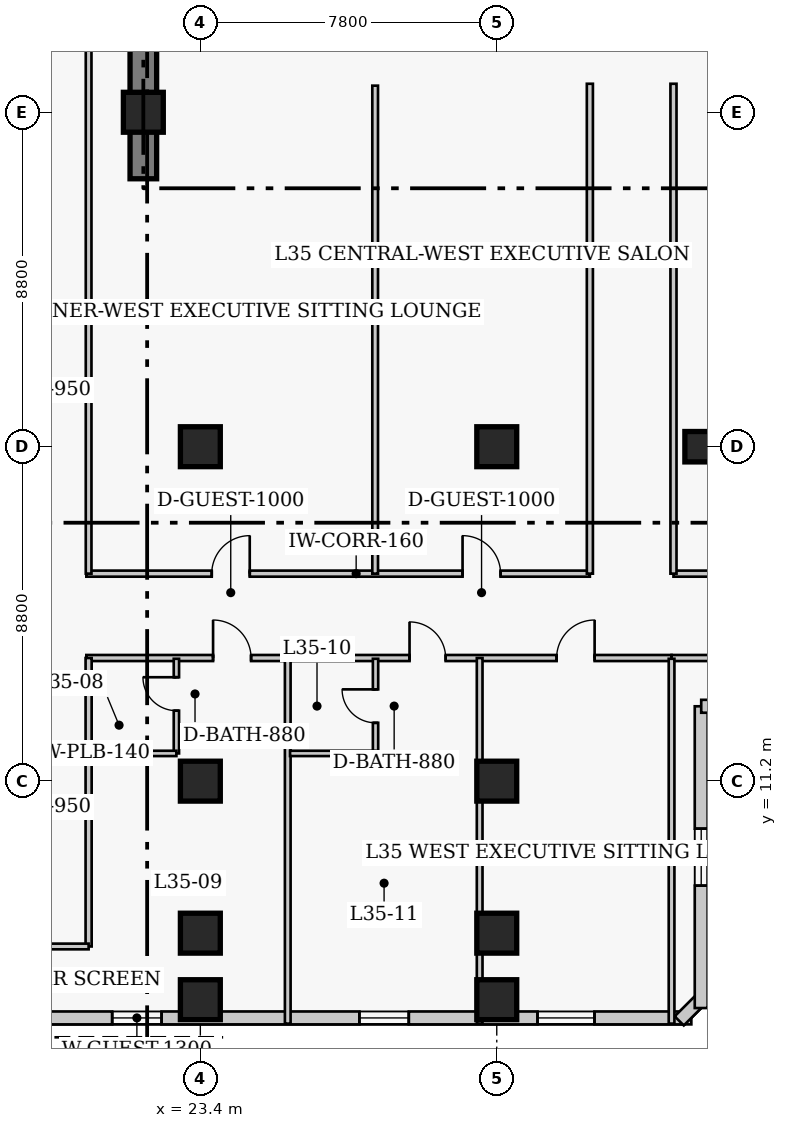
"""IFC4 building model, lengths in metres.
Left out: names, types, materials, properties, quantities, classifications, styles, units other than length and angle.
Written with IfcOpenShell. Run it as: python <this file> out.ifc"""

import sys

from ifc_helpers import new_model, si_unit, direction, frame, frame_2d, origin, origin_2d, place, context, subcontext, project, spatial, rectangle, extrude, element, fill, save


model = new_model("IFC4")
c1 = context("Model", 3, precision=1e-05, world=origin(), true_north=direction((0.0, 1.0)))
c2 = subcontext(c1, "Body", "Model", "MODEL_VIEW")
j1 = project(units=[si_unit("LENGTHUNIT", "METRE"), si_unit("PLANEANGLEUNIT", "RADIAN")], contexts=[c1])
p1 = place(None, origin())
s1 = spatial("IfcSite", under=j1, at=p1, CompositionType="ELEMENT")
p2 = place(p1, origin())
s2 = spatial("IfcBuilding", under=s1, at=p2, CompositionType="ELEMENT")
p3 = place(p2, frame((0.0, 0.0, 142.2)))
s3 = spatial("IfcBuildingStorey", under=s2, at=p3, CompositionType="ELEMENT", Elevation=142.2)
p4 = place(p3, frame((21.9, 27.05, 0.0), z_axis=(0.0, 0.0, 1.0), x_axis=(0.0, 1.0, 0.0)))
e1 = element("IfcWall", 1, at=p4, inside=s3, PredefinedType="SHEAR", context=c2, shape_type="SweptSolid", body=[
    extrude(rectangle(XDim=13.62, YDim=0.7, at=frame_2d((6.81, 0.0))), origin(), (0.0, 0.0, 1.0), 3.8),
])
for number, where, z_axis, x_axis in (
    (2, (23.4, 11.2, 0.0), (0.0, 0.0, 1.0), (1.0, 0.0, 0.0)),
    (3, (23.4, 20.0, 0.0), (0.0, 0.0, 1.0), (1.0, 0.0, 0.0)),
    (4, (31.2, 11.2, 0.0), (0.0, 0.0, 1.0), (1.0, 0.0, 0.0)),
    (5, (31.2, 20.0, 0.0), (0.0, 0.0, 1.0), (1.0, 0.0, 0.0)),
):
    element("IfcColumn", number, at=place(p3, frame(where, z_axis=z_axis, x_axis=x_axis)), inside=s3, PredefinedType="COLUMN", context=c2, shape_type="SweptSolid", body=[
        extrude(rectangle(XDim=1.05, YDim=1.05, at=origin_2d()), origin(), (0.0, 0.0, 1.0), 3.8),
    ])
p5 = place(p3, frame((36.75, 20.0, 0.0), z_axis=(0.0, 0.0, 1.0), x_axis=(1.0, 0.0, 0.0)))
e6 = element("IfcColumn", 6, at=p5, inside=s3, PredefinedType="COLUMN", context=c2, shape_type="SweptSolid", body=[
    extrude(rectangle(XDim=1.2, YDim=0.8, at=origin_2d()), origin(), (0.0, 0.0, 1.0), 3.8),
])
for number, where, z_axis, x_axis in (
    (7, (21.9, 28.8, 0.0), (0.0, 0.0, 1.0), (1.0, 0.0, 0.0)),
    (8, (23.4, 7.2, 0.0), (0.0, 0.0, 1.0), (1.0, 0.0, 0.0)),
    (9, (31.2, 7.2, 0.0), (0.0, 0.0, 1.0), (1.0, 0.0, 0.0)),
    (10, (23.4, 5.45, 0.0), (0.0, 0.0, 1.0), (1.0, 0.0, 0.0)),
    (11, (31.2, 5.45, 0.0), (0.0, 0.0, 1.0), (1.0, 0.0, 0.0)),
):
    element("IfcColumn", number, at=place(p3, frame(where, z_axis=z_axis, x_axis=x_axis)), inside=s3, PredefinedType="COLUMN", context=c2, shape_type="SweptSolid", body=[
        extrude(rectangle(XDim=1.05, YDim=1.05, at=origin_2d()), origin(), (0.0, 0.0, 1.0), 3.8),
    ])
p6 = place(p3, frame((9.63, 4.97, 0.0), z_axis=(0.0, 0.0, 1.0), x_axis=(1.0, 0.0, 0.0)))
e12 = element("IfcWall", 12, at=p6, inside=s3, PredefinedType="SOLIDWALL", context=c2, shape_type="SweptSolid", body=[
    extrude(rectangle(XDim=26.69, YDim=0.34, at=frame_2d((13.345, 0.0))), origin(), (0.0, 0.0, 1.0), 3.55),
])
p7 = place(p6, frame((3.048, 0.0, 0.85)))
e13 = element("IfcOpeningElement", 13, at=p7, cuts=e12, PredefinedType="OPENING", context=c2, shape_type="SweptSolid", body=[
    extrude(rectangle(XDim=1.5, YDim=1.75, at=frame_2d((0.75, 0.875))), frame((0.0, 0.18, 0.0), z_axis=(0.0, -1.0, 0.0), x_axis=(1.0, 0.0, 0.0)), (0.0, 0.0, 1.0), 0.36),
])
p8 = place(p6, frame((22.642, 0.0, 0.85)))
e14 = element("IfcOpeningElement", 14, at=p8, cuts=e12, PredefinedType="OPENING", context=c2, shape_type="SweptSolid", body=[
    extrude(rectangle(XDim=1.5, YDim=1.75, at=frame_2d((0.75, 0.875))), frame((0.0, 0.18, 0.0), z_axis=(0.0, -1.0, 0.0), x_axis=(1.0, 0.0, 0.0)), (0.0, 0.0, 1.0), 0.36),
])
p9 = place(p6, frame((11.45, 0.0, 0.85)))
e15 = element("IfcOpeningElement", 15, at=p9, cuts=e12, PredefinedType="OPENING", context=c2, shape_type="SweptSolid", body=[
    extrude(rectangle(XDim=1.3, YDim=1.7, at=frame_2d((0.65, 0.85))), frame((0.0, 0.18, 0.0), z_axis=(0.0, -1.0, 0.0), x_axis=(1.0, 0.0, 0.0)), (0.0, 0.0, 1.0), 0.36),
])
p10 = place(p6, frame((17.955, 0.0, 0.85)))
e16 = element("IfcOpeningElement", 16, at=p10, cuts=e12, PredefinedType="OPENING", context=c2, shape_type="SweptSolid", body=[
    extrude(rectangle(XDim=1.3, YDim=1.7, at=frame_2d((0.65, 0.85))), frame((0.0, 0.18, 0.0), z_axis=(0.0, -1.0, 0.0), x_axis=(1.0, 0.0, 0.0)), (0.0, 0.0, 1.0), 0.36),
])
p11 = place(p3, frame((36.001, 4.892, 0.0), z_axis=(0.0, 0.0, 1.0), x_axis=(0.707106781187, 0.707106781187, 0.0)))
e17 = element("IfcWall", 17, at=p11, inside=s3, PredefinedType="SOLIDWALL", context=c2, shape_type="SweptSolid", body=[
    extrude(rectangle(XDim=0.929, YDim=0.34, at=frame_2d((0.464, 0.0))), origin(), (0.0, 0.0, 1.0), 3.55),
])
p12 = place(p3, frame((36.58, 5.23, 0.0), z_axis=(0.0, 0.0, 1.0), x_axis=(0.0, 1.0, 0.0)))
e18 = element("IfcWall", 18, at=p12, inside=s3, PredefinedType="SOLIDWALL", context=c2, shape_type="SweptSolid", body=[
    extrude(rectangle(XDim=7.94, YDim=0.34, at=frame_2d((3.97, 0.0))), origin(), (0.0, 0.0, 1.0), 3.55),
])
p13 = place(p12, frame((3.22, 0.0, 0.85)))
e19 = element("IfcOpeningElement", 19, at=p13, cuts=e18, PredefinedType="OPENING", context=c2, shape_type="SweptSolid", body=[
    extrude(rectangle(XDim=1.5, YDim=1.75, at=frame_2d((0.75, 0.875))), frame((0.0, 0.18, 0.0), z_axis=(0.0, -1.0, 0.0), x_axis=(1.0, 0.0, 0.0)), (0.0, 0.0, 1.0), 0.36),
])
p14 = place(p3, frame((36.58, 13.17, 0.0), z_axis=(0.0, 0.0, 1.0), x_axis=(1.0, 0.0, 0.0)))
e20 = element("IfcWall", 20, at=p14, inside=s3, PredefinedType="SOLIDWALL", context=c2, shape_type="SweptSolid", body=[
    extrude(rectangle(XDim=4.84, YDim=0.34, at=frame_2d((2.42, 0.0))), origin(), (0.0, 0.0, 1.0), 3.55),
])
p15 = place(p14, frame((1.67, 0.0, 0.85)))
e21 = element("IfcOpeningElement", 21, at=p15, cuts=e20, PredefinedType="OPENING", context=c2, shape_type="SweptSolid", body=[
    extrude(rectangle(XDim=1.5, YDim=1.75, at=frame_2d((0.75, 0.875))), frame((0.0, 0.18, 0.0), z_axis=(0.0, -1.0, 0.0), x_axis=(1.0, 0.0, 0.0)), (0.0, 0.0, 1.0), 0.36),
])
p16 = place(p3, frame((20.4, 16.66, 0.0), z_axis=(0.0, 0.0, 1.0), x_axis=(1.0, 0.0, 0.0)))
e22 = element("IfcWall", 22, at=p16, inside=s3, PredefinedType="PARTITIONING", context=c2, shape_type="SweptSolid", body=[
    extrude(rectangle(XDim=13.25, YDim=0.16, at=frame_2d((6.625, 0.0))), origin(), (0.0, 0.0, 1.0), 3.55),
])
p17 = place(p16, frame((3.3, 0.0, 0.0)))
e23 = element("IfcOpeningElement", 23, at=p17, cuts=e22, PredefinedType="OPENING", context=c2, shape_type="SweptSolid", body=[
    extrude(rectangle(XDim=1.0, YDim=2.15, at=frame_2d((0.5, 1.075))), frame((0.0, 0.09, 0.0), z_axis=(0.0, -1.0, 0.0), x_axis=(1.0, 0.0, 0.0)), (0.0, 0.0, 1.0), 0.18),
])
p18 = place(p16, frame((9.9, 0.0, 0.0)))
e24 = element("IfcOpeningElement", 24, at=p18, cuts=e22, PredefinedType="OPENING", context=c2, shape_type="SweptSolid", body=[
    extrude(rectangle(XDim=1.0, YDim=2.15, at=frame_2d((0.5, 1.075))), frame((0.0, 0.09, 0.0), z_axis=(0.0, -1.0, 0.0), x_axis=(1.0, 0.0, 0.0)), (0.0, 0.0, 1.0), 0.18),
])
p19 = place(p3, frame((35.85, 16.66, 0.0), z_axis=(0.0, 0.0, 1.0), x_axis=(1.0, 0.0, 0.0)))
e25 = element("IfcWall", 25, at=p19, inside=s3, PredefinedType="PARTITIONING", context=c2, shape_type="SweptSolid", body=[
    extrude(rectangle(XDim=22.8, YDim=0.16, at=frame_2d((11.4, 0.0))), origin(), (0.0, 0.0, 1.0), 3.55),
])
p20 = place(p19, frame((9.65, 0.0, 0.0)))
e26 = element("IfcOpeningElement", 26, at=p20, cuts=e25, PredefinedType="OPENING", context=c2, shape_type="SweptSolid", body=[
    extrude(rectangle(XDim=1.0, YDim=2.15, at=frame_2d((0.5, 1.075))), frame((0.0, 0.09, 0.0), z_axis=(0.0, -1.0, 0.0), x_axis=(1.0, 0.0, 0.0)), (0.0, 0.0, 1.0), 0.18),
])
p21 = place(p19, frame((18.05, 0.0, 0.0)))
e27 = element("IfcOpeningElement", 27, at=p21, cuts=e25, PredefinedType="OPENING", context=c2, shape_type="SweptSolid", body=[
    extrude(rectangle(XDim=1.0, YDim=2.15, at=frame_2d((0.5, 1.075))), frame((0.0, 0.09, 0.0), z_axis=(0.0, -1.0, 0.0), x_axis=(1.0, 0.0, 0.0)), (0.0, 0.0, 1.0), 0.18),
])
for number, where, z_axis, x_axis in (
    (28, (33.65, 16.66, 0.0), (0.0, 0.0, 1.0), (0.0, 1.0, 0.0)),
    (29, (35.85, 16.66, 0.0), (0.0, 0.0, 1.0), (0.0, 1.0, 0.0)),
):
    element("IfcWall", number, at=place(p3, frame(where, z_axis=z_axis, x_axis=x_axis)), inside=s3, PredefinedType="PARTITIONING", context=c2, shape_type="SweptSolid", body=[
        extrude(rectangle(XDim=12.89, YDim=0.16, at=frame_2d((6.445, 0.0))), origin(), (0.0, 0.0, 1.0), 3.55),
    ])
p22 = place(p3, frame((20.4, 14.44, 0.0), z_axis=(0.0, 0.0, 1.0), x_axis=(1.0, 0.0, 0.0)))
e30 = element("IfcWall", 30, at=p22, inside=s3, PredefinedType="PARTITIONING", context=c2, shape_type="SweptSolid", body=[
    extrude(rectangle(XDim=15.4, YDim=0.16, at=frame_2d((7.7, 0.0))), origin(), (0.0, 0.0, 1.0), 3.55),
])
p23 = place(p22, frame((3.335, 0.0, 0.0)))
e31 = element("IfcOpeningElement", 31, at=p23, cuts=e30, PredefinedType="OPENING", context=c2, shape_type="SweptSolid", body=[
    extrude(rectangle(XDim=1.0, YDim=2.15, at=frame_2d((0.5, 1.075))), frame((0.0, 0.09, 0.0), z_axis=(0.0, -1.0, 0.0), x_axis=(1.0, 0.0, 0.0)), (0.0, 0.0, 1.0), 0.18),
])
p24 = place(p22, frame((8.505, 0.0, 0.0)))
e32 = element("IfcOpeningElement", 32, at=p24, cuts=e30, PredefinedType="OPENING", context=c2, shape_type="SweptSolid", body=[
    extrude(rectangle(XDim=0.95, YDim=2.1, at=frame_2d((0.475, 1.05))), frame((0.0, 0.09, 0.0), z_axis=(0.0, -1.0, 0.0), x_axis=(1.0, 0.0, 0.0)), (0.0, 0.0, 1.0), 0.18),
])
p25 = place(p22, frame((12.375, 0.0, 0.0)))
e33 = element("IfcOpeningElement", 33, at=p25, cuts=e30, PredefinedType="OPENING", context=c2, shape_type="SweptSolid", body=[
    extrude(rectangle(XDim=1.0, YDim=2.15, at=frame_2d((0.5, 1.075))), frame((0.0, 0.09, 0.0), z_axis=(0.0, -1.0, 0.0), x_axis=(1.0, 0.0, 0.0)), (0.0, 0.0, 1.0), 0.18),
])
p26 = place(p3, frame((35.8, 14.44, 0.0), z_axis=(0.0, 0.0, 1.0), x_axis=(1.0, 0.0, 0.0)))
e34 = element("IfcWall", 34, at=p26, inside=s3, PredefinedType="PARTITIONING", context=c2, shape_type="SweptSolid", body=[
    extrude(rectangle(XDim=22.85, YDim=0.16, at=frame_2d((11.425, 0.0))), origin(), (0.0, 0.0, 1.0), 3.55),
])
p27 = place(p26, frame((8.046, 0.0, 0.0)))
e35 = element("IfcOpeningElement", 35, at=p27, cuts=e34, PredefinedType="OPENING", context=c2, shape_type="SweptSolid", body=[
    extrude(rectangle(XDim=1.0, YDim=2.15, at=frame_2d((0.5, 1.075))), frame((0.0, 0.09, 0.0), z_axis=(0.0, -1.0, 0.0), x_axis=(1.0, 0.0, 0.0)), (0.0, 0.0, 1.0), 0.18),
])
p28 = place(p3, frame((20.46, 6.85, 0.0), z_axis=(0.0, 0.0, 1.0), x_axis=(0.0, 1.0, 0.0)))
e36 = element("IfcWall", 36, at=p28, inside=s3, PredefinedType="PARTITIONING", context=c2, shape_type="SweptSolid", body=[
    extrude(rectangle(XDim=7.59, YDim=0.16, at=frame_2d((3.795, 0.0))), origin(), (0.0, 0.0, 1.0), 3.55),
])
p29 = place(p3, frame((18.24, 6.85, 0.0), z_axis=(0.0, 0.0, 1.0), x_axis=(1.0, 0.0, 0.0)))
e37 = element("IfcWall", 37, at=p29, inside=s3, PredefinedType="PARTITIONING", context=c2, shape_type="SweptSolid", body=[
    extrude(rectangle(XDim=2.22, YDim=0.15, at=frame_2d((1.11, 0.0))), origin(), (0.0, 0.0, 1.0), 3.55),
])
p30 = place(p3, frame((20.46, 16.66, 0.0), z_axis=(0.0, 0.0, 1.0), x_axis=(0.0, 1.0, 0.0)))
e38 = element("IfcWall", 38, at=p30, inside=s3, PredefinedType="PARTITIONING", context=c2, shape_type="SweptSolid", body=[
    extrude(rectangle(XDim=16.14, YDim=0.15, at=frame_2d((8.07, 0.0))), origin(), (0.0, 0.0, 1.0), 3.55),
])
p31 = place(p3, frame((28.0, 16.66, 0.0), z_axis=(0.0, 0.0, 1.0), x_axis=(0.0, 1.0, 0.0)))
e39 = element("IfcWall", 39, at=p31, inside=s3, PredefinedType="PARTITIONING", context=c2, shape_type="SweptSolid", body=[
    extrude(rectangle(XDim=12.84, YDim=0.15, at=frame_2d((6.42, 0.0))), origin(), (0.0, 0.0, 1.0), 3.55),
])
p32 = place(p3, frame((22.77, 11.93, 0.0), z_axis=(0.0, 0.0, 1.0), x_axis=(0.0, 1.0, 0.0)))
e40 = element("IfcWall", 40, at=p32, inside=s3, PredefinedType="PLUMBINGWALL", context=c2, shape_type="SweptSolid", body=[
    extrude(rectangle(XDim=2.49, YDim=0.14, at=frame_2d((1.245, 0.0))), origin(), (0.0, 0.0, 1.0), 3.55),
])
p33 = place(p32, frame((1.125, 0.0, 0.0)))
e41 = element("IfcOpeningElement", 41, at=p33, cuts=e40, PredefinedType="OPENING", context=c2, shape_type="SweptSolid", body=[
    extrude(rectangle(XDim=0.88, YDim=2.05, at=frame_2d((0.44, 1.025))), frame((0.0, 0.08, 0.0), z_axis=(0.0, -1.0, 0.0), x_axis=(1.0, 0.0, 0.0)), (0.0, 0.0, 1.0), 0.16),
])
p34 = place(p3, frame((20.52, 11.93, 0.0), z_axis=(0.0, 0.0, 1.0), x_axis=(1.0, 0.0, 0.0)))
e42 = element("IfcWall", 42, at=p34, inside=s3, PredefinedType="PLUMBINGWALL", context=c2, shape_type="SweptSolid", body=[
    extrude(rectangle(XDim=2.25, YDim=0.14, at=frame_2d((1.125, 0.0))), origin(), (0.0, 0.0, 1.0), 3.55),
])
p35 = place(p3, frame((25.7, 4.82, 0.0), z_axis=(0.0, 0.0, 1.0), x_axis=(0.0, 1.0, 0.0)))
e43 = element("IfcWall", 43, at=p35, inside=s3, PredefinedType="PARTITIONING", context=c2, shape_type="SweptSolid", body=[
    extrude(rectangle(XDim=9.62, YDim=0.15, at=frame_2d((4.81, 0.0))), origin(), (0.0, 0.0, 1.0), 3.55),
])
p36 = place(p3, frame((28.01, 11.93, 0.0), z_axis=(0.0, 0.0, 1.0), x_axis=(0.0, 1.0, 0.0)))
e44 = element("IfcWall", 44, at=p36, inside=s3, PredefinedType="PLUMBINGWALL", context=c2, shape_type="SweptSolid", body=[
    extrude(rectangle(XDim=2.49, YDim=0.14, at=frame_2d((1.245, 0.0))), origin(), (0.0, 0.0, 1.0), 3.55),
])
p37 = place(p36, frame((0.805, 0.0, 0.0)))
e45 = element("IfcOpeningElement", 45, at=p37, cuts=e44, PredefinedType="OPENING", context=c2, shape_type="SweptSolid", body=[
    extrude(rectangle(XDim=0.88, YDim=2.05, at=frame_2d((0.44, 1.025))), frame((0.0, 0.08, 0.0), z_axis=(0.0, -1.0, 0.0), x_axis=(1.0, 0.0, 0.0)), (0.0, 0.0, 1.0), 0.16),
])
p38 = place(p3, frame((25.76, 11.93, 0.0), z_axis=(0.0, 0.0, 1.0), x_axis=(1.0, 0.0, 0.0)))
e46 = element("IfcWall", 46, at=p38, inside=s3, PredefinedType="PLUMBINGWALL", context=c2, shape_type="SweptSolid", body=[
    extrude(rectangle(XDim=2.25, YDim=0.14, at=frame_2d((1.125, 0.0))), origin(), (0.0, 0.0, 1.0), 3.55),
])
p39 = place(p3, frame((30.75, 4.82, 0.0), z_axis=(0.0, 0.0, 1.0), x_axis=(0.0, 1.0, 0.0)))
e47 = element("IfcWall", 47, at=p39, inside=s3, PredefinedType="PARTITIONING", context=c2, shape_type="SweptSolid", body=[
    extrude(rectangle(XDim=9.62, YDim=0.15, at=frame_2d((4.81, 0.0))), origin(), (0.0, 0.0, 1.0), 3.55),
])
p40 = place(p3, frame((35.8, 4.82, 0.0), z_axis=(0.0, 0.0, 1.0), x_axis=(0.0, 1.0, 0.0)))
e48 = element("IfcWall", 48, at=p40, inside=s3, PredefinedType="PARTITIONING", context=c2, shape_type="SweptSolid", body=[
    extrude(rectangle(XDim=9.6, YDim=0.15, at=frame_2d((4.8, 0.0))), origin(), (0.0, 0.0, 1.0), 3.55),
])
p41 = place(p8, origin())
e49 = element("IfcWindow", 49, at=p41, inside=s3, PartitioningType="SINGLE_PANEL", PredefinedType="WINDOW", context=c2, shape_type="SweptSolid", body=[
    extrude(rectangle(XDim=1.5, YDim=1.75, at=frame_2d((0.75, 0.875))), frame((0.0, 0.03, 0.0), z_axis=(0.0, -1.0, 0.0), x_axis=(1.0, 0.0, 0.0)), (0.0, 0.0, 1.0), 0.06),
])
fill(e14, e49)
p42 = place(p13, origin())
e50 = element("IfcWindow", 50, at=p42, inside=s3, PartitioningType="SINGLE_PANEL", PredefinedType="WINDOW", context=c2, shape_type="SweptSolid", body=[
    extrude(rectangle(XDim=1.5, YDim=1.75, at=frame_2d((0.75, 0.875))), frame((0.0, 0.03, 0.0), z_axis=(0.0, -1.0, 0.0), x_axis=(1.0, 0.0, 0.0)), (0.0, 0.0, 1.0), 0.06),
])
fill(e19, e50)
p43 = place(p9, origin())
e51 = element("IfcWindow", 51, at=p43, inside=s3, PartitioningType="SINGLE_PANEL", PredefinedType="WINDOW", context=c2, shape_type="SweptSolid", body=[
    extrude(rectangle(XDim=1.3, YDim=1.7, at=frame_2d((0.65, 0.85))), frame((0.0, 0.03, 0.0), z_axis=(0.0, -1.0, 0.0), x_axis=(1.0, 0.0, 0.0)), (0.0, 0.0, 1.0), 0.06),
])
fill(e15, e51)
p44 = place(p10, origin())
e52 = element("IfcWindow", 52, at=p44, inside=s3, PartitioningType="SINGLE_PANEL", PredefinedType="WINDOW", context=c2, shape_type="SweptSolid", body=[
    extrude(rectangle(XDim=1.3, YDim=1.7, at=frame_2d((0.65, 0.85))), frame((0.0, 0.03, 0.0), z_axis=(0.0, -1.0, 0.0), x_axis=(1.0, 0.0, 0.0)), (0.0, 0.0, 1.0), 0.06),
])
fill(e16, e52)
p45 = place(p17, origin())
e53 = element("IfcDoor", 53, at=p45, inside=s3, OperationType="SINGLE_SWING_RIGHT", PredefinedType="DOOR", context=c2, shape_type="SweptSolid", body=[
    extrude(rectangle(XDim=1.0, YDim=2.15, at=frame_2d((0.5, 1.075))), frame((0.0, 0.025, 0.0), z_axis=(0.0, -1.0, 0.0), x_axis=(1.0, 0.0, 0.0)), (0.0, 0.0, 1.0), 0.05),
])
fill(e23, e53)
p46 = place(p18, origin())
e54 = element("IfcDoor", 54, at=p46, inside=s3, OperationType="SINGLE_SWING_LEFT", PredefinedType="DOOR", context=c2, shape_type="SweptSolid", body=[
    extrude(rectangle(XDim=1.0, YDim=2.15, at=frame_2d((0.5, 1.075))), frame((0.0, 0.025, 0.0), z_axis=(0.0, -1.0, 0.0), x_axis=(1.0, 0.0, 0.0)), (0.0, 0.0, 1.0), 0.05),
])
fill(e24, e54)
p47 = place(p33, origin())
e55 = element("IfcDoor", 55, at=p47, inside=s3, OperationType="SINGLE_SWING_RIGHT", PredefinedType="DOOR", context=c2, shape_type="SweptSolid", body=[
    extrude(rectangle(XDim=0.88, YDim=2.05, at=frame_2d((0.44, 1.025))), frame((0.0, 0.025, 0.0), z_axis=(0.0, -1.0, 0.0), x_axis=(1.0, 0.0, 0.0)), (0.0, 0.0, 1.0), 0.05),
])
fill(e41, e55)
p48 = place(p23, origin())
e56 = element("IfcDoor", 56, at=p48, inside=s3, OperationType="SINGLE_SWING_LEFT", PredefinedType="DOOR", context=c2, shape_type="SweptSolid", body=[
    extrude(rectangle(XDim=1.0, YDim=2.15, at=frame_2d((0.5, 1.075))), frame((0.0, 0.025, 0.0), z_axis=(0.0, -1.0, 0.0), x_axis=(1.0, 0.0, 0.0)), (0.0, 0.0, 1.0), 0.05),
])
fill(e31, e56)
p49 = place(p37, origin())
e57 = element("IfcDoor", 57, at=p49, inside=s3, OperationType="SINGLE_SWING_RIGHT", PredefinedType="DOOR", context=c2, shape_type="SweptSolid", body=[
    extrude(rectangle(XDim=0.88, YDim=2.05, at=frame_2d((0.44, 1.025))), frame((0.0, 0.025, 0.0), z_axis=(0.0, -1.0, 0.0), x_axis=(1.0, 0.0, 0.0)), (0.0, 0.0, 1.0), 0.05),
])
fill(e45, e57)
p50 = place(p24, origin())
e58 = element("IfcDoor", 58, at=p50, inside=s3, OperationType="SINGLE_SWING_LEFT", PredefinedType="DOOR", context=c2, shape_type="SweptSolid", body=[
    extrude(rectangle(XDim=0.95, YDim=2.1, at=frame_2d((0.475, 1.05))), frame((0.0, 0.025, 0.0), z_axis=(0.0, -1.0, 0.0), x_axis=(1.0, 0.0, 0.0)), (0.0, 0.0, 1.0), 0.05),
])
fill(e32, e58)
p51 = place(p25, origin())
e59 = element("IfcDoor", 59, at=p51, inside=s3, OperationType="SINGLE_SWING_RIGHT", PredefinedType="DOOR", context=c2, shape_type="SweptSolid", body=[
    extrude(rectangle(XDim=1.0, YDim=2.15, at=frame_2d((0.5, 1.075))), frame((0.0, 0.025, 0.0), z_axis=(0.0, -1.0, 0.0), x_axis=(1.0, 0.0, 0.0)), (0.0, 0.0, 1.0), 0.05),
])
fill(e33, e59)
save(model, sys.argv[1])
